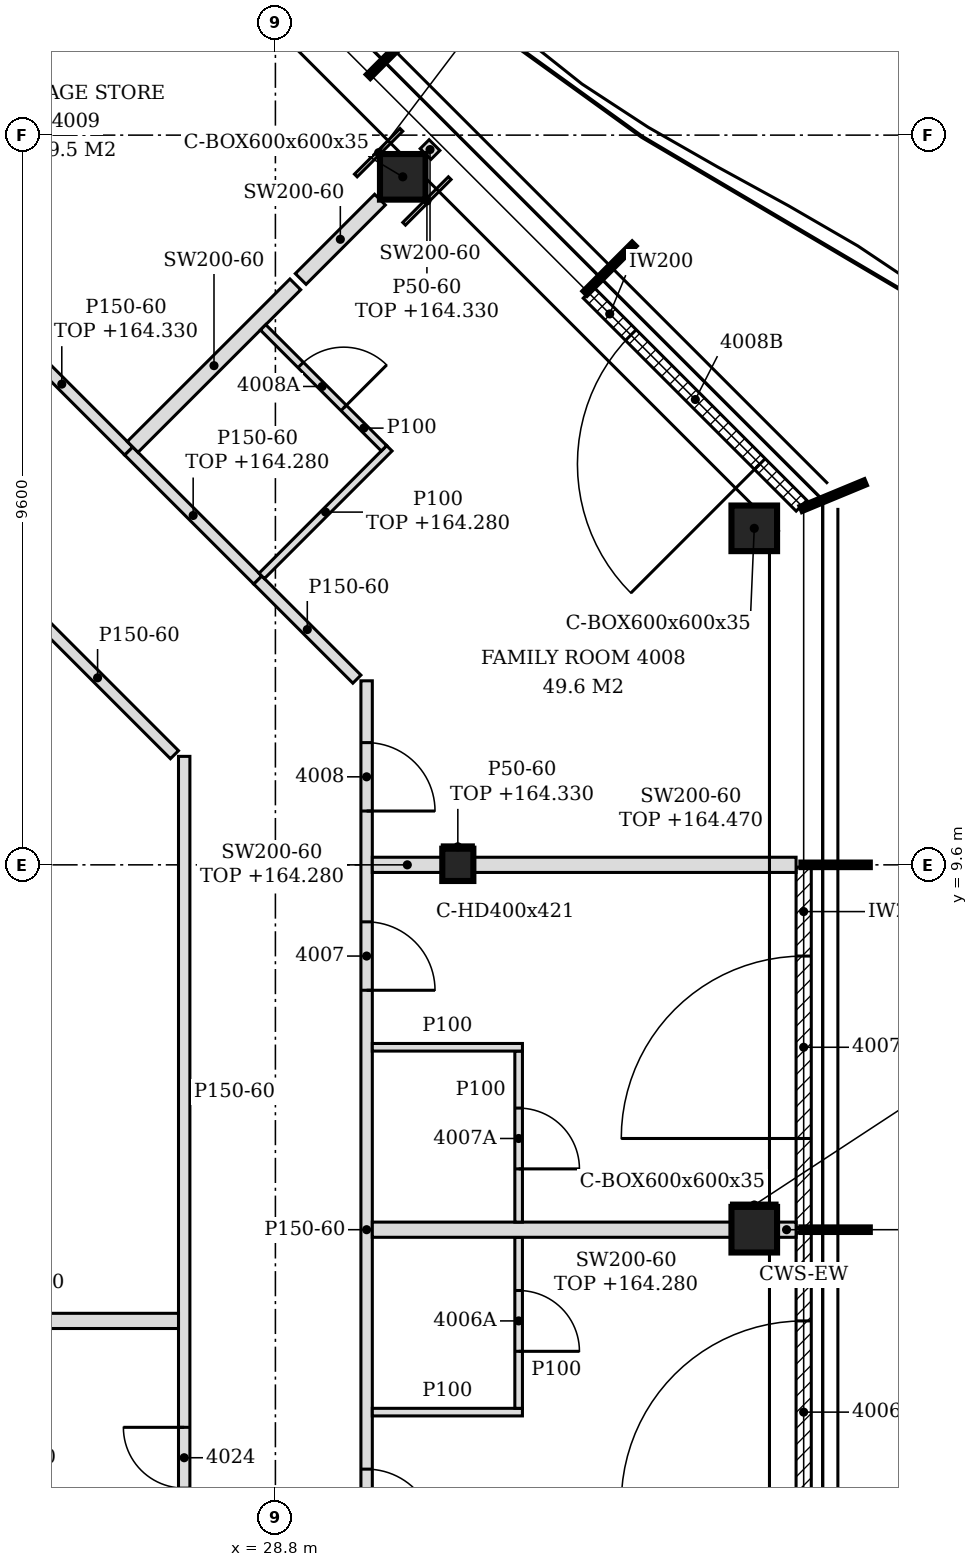
"""IFC4 building model, lengths in metres.
Left out: names, types, materials, properties, quantities, classifications, styles, units other than length and angle.
Written with IfcOpenShell. Run it as: python <this file> out.ifc"""

import sys

from ifc_helpers import new_model, si_unit, direction, frame, frame_2d, origin, origin_2d, place, context, subcontext, project, spatial, polyline, rectangle, hollow_rectangle, i_section, outline, extrude, element, fill, save


model = new_model("IFC4")
c1 = context("Model", 3, precision=1e-05, world=origin(), true_north=direction((0.0, 1.0)))
c2 = subcontext(c1, "Body", "Model", "MODEL_VIEW")
j1 = project(units=[si_unit("LENGTHUNIT", "METRE"), si_unit("PLANEANGLEUNIT", "RADIAN")], contexts=[c1])
p1 = place(None, origin())
s1 = spatial("IfcSite", under=j1, at=p1, CompositionType="ELEMENT")
p2 = place(p1, origin())
s2 = spatial("IfcBuilding", under=s1, at=p2, CompositionType="ELEMENT")
p3 = place(p2, frame((0.0, 0.0, 161.4)))
s3 = spatial("IfcBuildingStorey", under=s2, at=p3, CompositionType="ELEMENT", Elevation=161.4)
for number, where, z_axis, x_axis in (
    (1, (35.1, 4.8, -0.15), (0.0, 0.0, 1.0), (1.0, 0.0, 0.0)),
    (2, (35.1, 14.027, -0.15), (0.0, 0.0, 1.0), (1.0, 0.0, 0.0)),
    (3, (30.476, 18.652, -0.15), (0.0, 0.0, 1.0), (1.0, 0.0, 0.0)),
):
    element("IfcColumn", number, at=place(p3, frame(where, z_axis=z_axis, x_axis=x_axis)), inside=s3, PredefinedType="COLUMN", context=c2, shape_type="SweptSolid", body=[
        extrude(hollow_rectangle(XDim=0.6, YDim=0.6, WallThickness=0.035, at=origin_2d()), origin(), (0.0, 0.0, 1.0), 3.6),
    ])
p4 = place(p3, frame((31.2, 9.6, -0.15), z_axis=(0.0, 0.0, 1.0), x_axis=(1.0, 0.0, 0.0)))
e4 = element("IfcColumn", 4, at=p4, inside=s3, PredefinedType="COLUMN", context=c2, shape_type="SweptSolid", body=[
    extrude(i_section(OverallWidth=0.409, OverallDepth=0.425, WebThickness=0.033, FlangeThickness=0.052, FilletRadius=0.015, at=origin_2d()), origin(), (0.0, 0.0, 1.0), 3.6),
])
p5 = place(p3, frame((35.75, 0.03, 0.0), z_axis=(0.0, 0.0, 1.0), x_axis=(0.0, 1.0, 0.0)))
e5 = element("IfcWall", 5, at=p5, inside=s3, PredefinedType="NOTDEFINED", context=c2, shape_type="SweptSolid", body=[
    extrude(rectangle(XDim=4.74, YDim=0.2, at=frame_2d((2.37, 0.0))), origin(), (0.0, 0.0, 1.0), 3.45),
])
p6 = place(p5, frame((1.17, 0.0, 0.0)))
e6 = element("IfcOpeningElement", 6, at=p6, cuts=e5, PredefinedType="OPENING", context=c2, shape_type="SweptSolid", body=[
    extrude(rectangle(XDim=2.4, YDim=2.4, at=frame_2d((1.2, 1.2))), frame((0.0, 0.11, 0.0), z_axis=(0.0, -1.0, 0.0), x_axis=(1.0, 0.0, 0.0)), (0.0, 0.0, 1.0), 0.22),
])
p7 = place(p3, frame((35.75, 4.83, 0.0), z_axis=(0.0, 0.0, 1.0), x_axis=(0.0, 1.0, 0.0)))
e7 = element("IfcWall", 7, at=p7, inside=s3, PredefinedType="NOTDEFINED", context=c2, shape_type="SweptSolid", body=[
    extrude(rectangle(XDim=4.74, YDim=0.2, at=frame_2d((2.37, 0.0))), origin(), (0.0, 0.0, 1.0), 3.45),
])
p8 = place(p7, frame((1.17, 0.0, 0.0)))
e8 = element("IfcOpeningElement", 8, at=p8, cuts=e7, PredefinedType="OPENING", context=c2, shape_type="SweptSolid", body=[
    extrude(rectangle(XDim=2.4, YDim=2.4, at=frame_2d((1.2, 1.2))), frame((0.0, 0.11, 0.0), z_axis=(0.0, -1.0, 0.0), x_axis=(1.0, 0.0, 0.0)), (0.0, 0.0, 1.0), 0.22),
])
p9 = place(p3, frame((35.722, 14.325, 0.0), z_axis=(0.0, 0.0, 1.0), x_axis=(-0.707106781187, 0.707106781187, 0.0)))
e9 = element("IfcWall", 9, at=p9, inside=s3, PredefinedType="NOTDEFINED", context=c2, shape_type="SweptSolid", body=[
    extrude(rectangle(XDim=3.962, YDim=0.2, at=frame_2d((1.981, 0.0))), origin(), (0.0, 0.0, 1.0), 3.45),
])
p10 = place(p9, frame((0.775, 0.0, 0.0)))
e10 = element("IfcOpeningElement", 10, at=p10, cuts=e9, PredefinedType="OPENING", context=c2, shape_type="SweptSolid", body=[
    extrude(rectangle(XDim=2.4, YDim=2.4, at=frame_2d((1.2, 1.2))), frame((0.0, 0.11, 0.0), z_axis=(0.0, -1.0, 0.0), x_axis=(1.0, 0.0, 0.0)), (0.0, 0.0, 1.0), 0.22),
])
p11 = place(p3, frame((30.0, -0.813, 0.0), z_axis=(0.0, 0.0, 1.0), x_axis=(0.0, 1.0, 0.0)))
e11 = element("IfcWall", 11, at=p11, inside=s3, PredefinedType="PARTITIONING", context=c2, shape_type="SweptSolid", body=[
    extrude(outline(polyline([(0.0, 0.0), (12.834, 0.0), (12.834, 3.45), (10.518, 3.45), (10.516, 2.88), (10.308, 2.88), (10.306, 3.45), (5.718, 3.45), (5.716, 2.88), (5.508, 2.88), (5.506, 3.45), (0.918, 3.45), (0.916, 2.88), (0.708, 2.88), (0.706, 3.45), (0.0, 3.45), (0.0, 0.0)])), frame((0.0, 0.075, 0.0), z_axis=(0.0, -1.0, 0.0), x_axis=(1.0, 0.0, 0.0)), (0.0, 0.0, 1.0), 0.15),
])
p12 = place(p11, frame((1.563, 0.0, 0.0)))
e12 = element("IfcOpeningElement", 12, at=p12, cuts=e11, PredefinedType="OPENING", context=c2, shape_type="SweptSolid", body=[
    extrude(rectangle(XDim=0.9, YDim=2.1, at=frame_2d((0.45, 1.05))), frame((0.0, 0.085, 0.0), z_axis=(0.0, -1.0, 0.0), x_axis=(1.0, 0.0, 0.0)), (0.0, 0.0, 1.0), 0.17),
])
p13 = place(p11, frame((8.763, 0.0, 0.0)))
e13 = element("IfcOpeningElement", 13, at=p13, cuts=e11, PredefinedType="OPENING", context=c2, shape_type="SweptSolid", body=[
    extrude(rectangle(XDim=0.9, YDim=2.1, at=frame_2d((0.45, 1.05))), frame((0.0, 0.085, 0.0), z_axis=(0.0, -1.0, 0.0), x_axis=(1.0, 0.0, 0.0)), (0.0, 0.0, 1.0), 0.17),
])
p14 = place(p11, frame((11.121, 0.0, 0.0)))
e14 = element("IfcOpeningElement", 14, at=p14, cuts=e11, PredefinedType="OPENING", context=c2, shape_type="SweptSolid", body=[
    extrude(rectangle(XDim=0.9, YDim=2.1, at=frame_2d((0.45, 1.05))), frame((0.0, 0.085, 0.0), z_axis=(0.0, -1.0, 0.0), x_axis=(1.0, 0.0, 0.0)), (0.0, 0.0, 1.0), 0.17),
])
p15 = place(p3, frame((27.6, 0.1, 0.0), z_axis=(0.0, 0.0, 1.0), x_axis=(0.0, 1.0, 0.0)))
e15 = element("IfcWall", 15, at=p15, inside=s3, PredefinedType="PARTITIONING", context=c2, shape_type="SweptSolid", body=[
    extrude(outline(polyline([(0.0, 0.0), (10.927, 0.0), (10.927, 3.45), (9.605, 3.45), (9.603, 2.88), (9.395, 2.88), (9.393, 3.45), (4.805, 3.45), (4.803, 2.88), (4.595, 2.88), (4.593, 3.45), (0.005, 3.45), (0.003, 2.88), (0.0, 2.88), (0.0, 0.0)])), frame((0.0, 0.075, 0.0), z_axis=(0.0, -1.0, 0.0), x_axis=(1.0, 0.0, 0.0)), (0.0, 0.0, 1.0), 0.15),
])
p16 = place(p15, frame((1.3, 0.0, 0.0)))
e16 = element("IfcOpeningElement", 16, at=p16, cuts=e15, PredefinedType="OPENING", context=c2, shape_type="SweptSolid", body=[
    extrude(rectangle(XDim=0.8, YDim=2.1, at=frame_2d((0.4, 1.05))), frame((0.0, 0.085, 0.0), z_axis=(0.0, -1.0, 0.0), x_axis=(1.0, 0.0, 0.0)), (0.0, 0.0, 1.0), 0.17),
])
p17 = place(p3, frame((30.075, 2.4, 0.0), z_axis=(0.0, 0.0, 1.0), x_axis=(1.0, 0.0, 0.0)))
e17 = element("IfcWall", 17, at=p17, inside=s3, PredefinedType="PARTITIONING", context=c2, shape_type="SweptSolid", body=[
    extrude(outline(polyline([(0.0, 0.0), (1.975, 0.0), (1.975, 3.45), (1.275, 3.45), (1.273, 2.93), (0.975, 2.93), (0.973, 3.45), (0.0, 3.45), (0.0, 0.0)])), frame((0.0, 0.05, 0.0), z_axis=(0.0, -1.0, 0.0), x_axis=(1.0, 0.0, 0.0)), (0.0, 0.0, 1.0), 0.1),
])
p18 = place(p3, frame((32.0, 2.45, 0.0), z_axis=(0.0, 0.0, 1.0), x_axis=(0.0, 1.0, 0.0)))
e18 = element("IfcWall", 18, at=p18, inside=s3, PredefinedType="PARTITIONING", context=c2, shape_type="SweptSolid", body=[
    extrude(rectangle(XDim=2.25, YDim=0.1, at=frame_2d((1.125, 0.0))), origin(), (0.0, 0.0, 1.0), 3.45),
])
p19 = place(p18, frame((0.75, 0.0, 0.0)))
e19 = element("IfcOpeningElement", 19, at=p19, cuts=e18, PredefinedType="OPENING", context=c2, shape_type="SweptSolid", body=[
    extrude(rectangle(XDim=0.8, YDim=2.1, at=frame_2d((0.4, 1.05))), frame((0.0, 0.06, 0.0), z_axis=(0.0, -1.0, 0.0), x_axis=(1.0, 0.0, 0.0)), (0.0, 0.0, 1.0), 0.12),
])
p20 = place(p3, frame((24.2, 3.6, 0.0), z_axis=(0.0, 0.0, 1.0), x_axis=(1.0, 0.0, 0.0)))
e20 = element("IfcWall", 20, at=p20, inside=s3, PredefinedType="PARTITIONING", context=c2, shape_type="SweptSolid", body=[
    extrude(rectangle(XDim=3.325, YDim=0.2, at=frame_2d((1.663, 0.0))), origin(), (0.0, 0.0, 1.0), 3.45),
])
p21 = place(p3, frame((30.075, 4.8, 0.0), z_axis=(0.0, 0.0, 1.0), x_axis=(1.0, 0.0, 0.0)))
e21 = element("IfcWall", 21, at=p21, inside=s3, PredefinedType="PARTITIONING", context=c2, shape_type="SweptSolid", body=[
    extrude(rectangle(XDim=4.725, YDim=0.2, at=frame_2d((2.363, 0.0))), origin(), (0.0, 0.0, 1.0), 2.88),
])
p22 = place(p3, frame((35.4, 4.8, 0.0), z_axis=(0.0, 0.0, 1.0), x_axis=(1.0, 0.0, 0.0)))
e22 = element("IfcWall", 22, at=p22, inside=s3, PredefinedType="PARTITIONING", context=c2, shape_type="SweptSolid", body=[
    extrude(rectangle(XDim=0.25, YDim=0.2, at=frame_2d((0.125, 0.0))), origin(), (0.0, 0.0, 1.0), 3.45),
])
p23 = place(p3, frame((32.0, 4.9, 0.0), z_axis=(0.0, 0.0, 1.0), x_axis=(0.0, 1.0, 0.0)))
e23 = element("IfcWall", 23, at=p23, inside=s3, PredefinedType="PARTITIONING", context=c2, shape_type="SweptSolid", body=[
    extrude(rectangle(XDim=2.25, YDim=0.1, at=frame_2d((1.125, 0.0))), origin(), (0.0, 0.0, 1.0), 3.45),
])
p24 = place(p23, frame((0.7, 0.0, 0.0)))
e24 = element("IfcOpeningElement", 24, at=p24, cuts=e23, PredefinedType="OPENING", context=c2, shape_type="SweptSolid", body=[
    extrude(rectangle(XDim=0.8, YDim=2.1, at=frame_2d((0.4, 1.05))), frame((0.0, 0.06, 0.0), z_axis=(0.0, -1.0, 0.0), x_axis=(1.0, 0.0, 0.0)), (0.0, 0.0, 1.0), 0.12),
])
p25 = place(p3, frame((30.075, 7.2, 0.0), z_axis=(0.0, 0.0, 1.0), x_axis=(1.0, 0.0, 0.0)))
e25 = element("IfcWall", 25, at=p25, inside=s3, PredefinedType="PARTITIONING", context=c2, shape_type="SweptSolid", body=[
    extrude(outline(polyline([(0.0, 0.0), (1.975, 0.0), (1.975, 3.45), (1.275, 3.45), (1.273, 2.93), (0.975, 2.93), (0.973, 3.45), (0.0, 3.45), (0.0, 0.0)])), frame((0.0, 0.05, 0.0), z_axis=(0.0, -1.0, 0.0), x_axis=(1.0, 0.0, 0.0)), (0.0, 0.0, 1.0), 0.1),
])
p26 = place(p3, frame((30.075, 9.6, 0.0), z_axis=(0.0, 0.0, 1.0), x_axis=(1.0, 0.0, 0.0)))
e26 = element("IfcWall", 26, at=p26, inside=s3, PredefinedType="PARTITIONING", context=c2, shape_type="SweptSolid", body=[
    extrude(rectangle(XDim=0.921, YDim=0.2, at=frame_2d((0.46, 0.0))), origin(), (0.0, 0.0, 1.0), 2.88),
])
p27 = place(p3, frame((31.405, 9.6, 0.0), z_axis=(0.0, 0.0, 1.0), x_axis=(1.0, 0.0, 0.0)))
e27 = element("IfcWall", 27, at=p27, inside=s3, PredefinedType="PARTITIONING", context=c2, shape_type="SweptSolid", body=[
    extrude(outline(polyline([(0.0, 0.0), (4.245, 0.0), (4.246, 3.07), (3.845, 3.07), (3.844, 2.93), (3.545, 2.93), (3.543, 3.07), (0.0, 3.07), (0.0, 0.0)])), frame((0.0, 0.1, 0.0), z_axis=(0.0, -1.0, 0.0), x_axis=(1.0, 0.0, 0.0)), (0.0, 0.0, 1.0), 0.2),
])
p28 = place(p3, frame((27.472, 11.049, 0.0), z_axis=(0.0, 0.0, 1.0), x_axis=(-0.707106781187, 0.707106781187, 0.0)))
e28 = element("IfcWall", 28, at=p28, inside=s3, PredefinedType="PARTITIONING", context=c2, shape_type="SweptSolid", body=[
    extrude(rectangle(XDim=2.861, YDim=0.15, at=frame_2d((1.43, 0.0))), origin(), (0.0, 0.0, 1.0), 3.45),
])
p29 = place(p3, frame((29.872, 12.043, 0.0), z_axis=(0.0, 0.0, 1.0), x_axis=(-0.707172918471, 0.707040637716, 0.0)))
e29 = element("IfcWall", 29, at=p29, inside=s3, PredefinedType="PARTITIONING", context=c2, shape_type="SweptSolid", body=[
    extrude(rectangle(XDim=1.846, YDim=0.15, at=frame_2d((0.923, 0.0))), origin(), (0.0, 0.0, 1.0), 3.45),
])
p30 = place(p3, frame((28.567, 13.348, 0.0), z_axis=(0.0, 0.0, 1.0), x_axis=(-0.707310148094, 0.706903355773, 0.0)))
e30 = element("IfcWall", 30, at=p30, inside=s3, PredefinedType="PARTITIONING", context=c2, shape_type="SweptSolid", body=[
    extrude(rectangle(XDim=2.401, YDim=0.15, at=frame_2d((1.2, 0.0))), origin(), (0.0, 0.0, 1.0), 2.88),
])
p31 = place(p3, frame((28.62, 13.401, 0.0), z_axis=(0.0, 0.0, 1.0), x_axis=(0.707055379538, 0.707158179099, 0.0)))
e31 = element("IfcWall", 31, at=p31, inside=s3, PredefinedType="PARTITIONING", context=c2, shape_type="SweptSolid", body=[
    extrude(rectangle(XDim=2.375, YDim=0.1, at=frame_2d((1.188, 0.0))), origin(), (0.0, 0.0, 1.0), 2.88),
])
p32 = place(p3, frame((26.869, 15.045, 0.0), z_axis=(0.0, 0.0, 1.0), x_axis=(-0.706999586952, 0.707213959174, 0.0)))
e32 = element("IfcWall", 32, at=p32, inside=s3, PredefinedType="PARTITIONING", context=c2, shape_type="SweptSolid", body=[
    extrude(rectangle(XDim=5.694, YDim=0.15, at=frame_2d((2.847, 0.0))), origin(), (0.0, 0.0, 1.0), 2.93),
])
p33 = place(p32, frame((2.487, 0.0, 0.0)))
e33 = element("IfcOpeningElement", 33, at=p33, cuts=e32, PredefinedType="OPENING", context=c2, shape_type="SweptSolid", body=[
    extrude(rectangle(XDim=0.9, YDim=2.1, at=frame_2d((0.45, 1.05))), frame((0.0, 0.085, 0.0), z_axis=(0.0, -1.0, 0.0), x_axis=(1.0, 0.0, 0.0)), (0.0, 0.0, 1.0), 0.17),
])
p34 = place(p3, frame((26.922, 15.098, 0.0), z_axis=(0.0, 0.0, 1.0), x_axis=(0.707268147401, 0.706945378138, 0.0)))
e34 = element("IfcWall", 34, at=p34, inside=s3, PredefinedType="PARTITIONING", context=c2, shape_type="SweptSolid", body=[
    extrude(rectangle(XDim=3.026, YDim=0.2, at=frame_2d((1.513, 0.0))), origin(), (0.0, 0.0, 1.0), 3.45),
])
p35 = place(p3, frame((30.229, 15.08, 0.0), z_axis=(0.0, 0.0, 1.0), x_axis=(-0.707052524, 0.70716103421, 0.0)))
e35 = element("IfcWall", 35, at=p35, inside=s3, PredefinedType="PARTITIONING", context=c2, shape_type="SweptSolid", body=[
    extrude(rectangle(XDim=2.25, YDim=0.1, at=frame_2d((1.125, 0.0))), origin(), (0.0, 0.0, 1.0), 3.45),
])
p36 = place(p35, frame((0.75, 0.0, 0.0)))
e36 = element("IfcOpeningElement", 36, at=p36, cuts=e35, PredefinedType="OPENING", context=c2, shape_type="SweptSolid", body=[
    extrude(rectangle(XDim=0.8, YDim=2.1, at=frame_2d((0.4, 1.05))), frame((0.0, 0.06, 0.0), z_axis=(0.0, -1.0, 0.0), x_axis=(1.0, 0.0, 0.0)), (0.0, 0.0, 1.0), 0.12),
])
p37 = place(p3, frame((29.133, 17.308, 0.0), z_axis=(0.0, 0.0, 1.0), x_axis=(0.707024044771, 0.707189507922, 0.0)))
e37 = element("IfcWall", 37, at=p37, inside=s3, PredefinedType="PARTITIONING", context=c2, shape_type="SweptSolid", body=[
    extrude(rectangle(XDim=1.476, YDim=0.2, at=frame_2d((0.738, 0.0))), origin(), (0.0, 0.0, 1.0), 3.45),
])
p38 = place(p3, frame((30.776, 18.951, 0.0), z_axis=(0.0, 0.0, 1.0), x_axis=(0.706370595651, 0.707842201059, 0.0)))
e38 = element("IfcWall", 38, at=p38, inside=s3, PredefinedType="PARTITIONING", context=c2, shape_type="SweptSolid", body=[
    extrude(rectangle(XDim=0.166, YDim=0.2, at=frame_2d((0.083, 0.0))), origin(), (0.0, 0.0, 1.0), 3.45),
])
p39 = place(p3, frame((34.8, 5.125, 0.0), z_axis=(0.0, 0.0, 1.0), x_axis=(1.0, 0.0, 0.0)))
e39 = element("IfcWall", 39, at=p39, inside=s3, PredefinedType="PARTITIONING", context=c2, shape_type="SweptSolid", body=[
    extrude(rectangle(XDim=0.6, YDim=0.05, at=frame_2d((0.3, 0.0))), origin(), (0.0, 0.0, 1.0), 2.93),
])
p40 = place(p3, frame((30.996, 9.837, 0.0), z_axis=(0.0, 0.0, 1.0), x_axis=(1.0, 0.0, 0.0)))
e40 = element("IfcWall", 40, at=p40, inside=s3, PredefinedType="PARTITIONING", context=c2, shape_type="SweptSolid", body=[
    extrude(rectangle(XDim=0.409, YDim=0.05, at=frame_2d((0.205, 0.0))), origin(), (0.0, 0.0, 1.0), 2.93),
])
p41 = place(p3, frame((29.858, 18.669, 0.0), z_axis=(0.0, 0.0, 1.0), x_axis=(0.707106781187, 0.707106781187, 0.0)))
e41 = element("IfcWall", 41, at=p41, inside=s3, PredefinedType="PARTITIONING", context=c2, shape_type="SweptSolid", body=[
    extrude(rectangle(XDim=0.849, YDim=0.05, at=frame_2d((0.424, 0.0))), origin(), (0.0, 0.0, 1.0), 2.63),
])
p42 = place(p3, frame((30.493, 18.034, 0.0), z_axis=(0.0, 0.0, 1.0), x_axis=(0.707106781187, 0.707106781187, 0.0)))
e42 = element("IfcWall", 42, at=p42, inside=s3, PredefinedType="PARTITIONING", context=c2, shape_type="SweptSolid", body=[
    extrude(rectangle(XDim=0.849, YDim=0.05, at=frame_2d((0.424, 0.0))), origin(), (0.0, 0.0, 1.0), 2.93),
])
p43 = place(p6, origin())
e43 = element("IfcDoor", 43, at=p43, inside=s3, OperationType="SINGLE_SWING_LEFT", PredefinedType="DOOR", context=c2, shape_type="SweptSolid", body=[
    extrude(rectangle(XDim=2.4, YDim=2.4, at=frame_2d((1.2, 1.2))), frame((0.0, 0.025, 0.0), z_axis=(0.0, -1.0, 0.0), x_axis=(1.0, 0.0, 0.0)), (0.0, 0.0, 1.0), 0.05),
])
fill(e6, e43)
p44 = place(p8, origin())
e44 = element("IfcDoor", 44, at=p44, inside=s3, OperationType="SINGLE_SWING_LEFT", PredefinedType="DOOR", context=c2, shape_type="SweptSolid", body=[
    extrude(rectangle(XDim=2.4, YDim=2.4, at=frame_2d((1.2, 1.2))), frame((0.0, 0.025, 0.0), z_axis=(0.0, -1.0, 0.0), x_axis=(1.0, 0.0, 0.0)), (0.0, 0.0, 1.0), 0.05),
])
fill(e8, e44)
p45 = place(p10, origin())
e45 = element("IfcDoor", 45, at=p45, inside=s3, OperationType="SINGLE_SWING_LEFT", PredefinedType="DOOR", context=c2, shape_type="SweptSolid", body=[
    extrude(rectangle(XDim=2.4, YDim=2.4, at=frame_2d((1.2, 1.2))), frame((0.0, 0.025, 0.0), z_axis=(0.0, -1.0, 0.0), x_axis=(1.0, 0.0, 0.0)), (0.0, 0.0, 1.0), 0.05),
])
fill(e10, e45)
p46 = place(p12, frame((0.9, 0.0, 0.0), z_axis=(0.0, 0.0, 1.0), x_axis=(-1.0, 0.0, 0.0)))
e46 = element("IfcDoor", 46, at=p46, inside=s3, OperationType="SINGLE_SWING_RIGHT", PredefinedType="DOOR", context=c2, shape_type="SweptSolid", body=[
    extrude(rectangle(XDim=0.9, YDim=2.1, at=frame_2d((0.45, 1.05))), frame((0.0, 0.025, 0.0), z_axis=(0.0, -1.0, 0.0), x_axis=(1.0, 0.0, 0.0)), (0.0, 0.0, 1.0), 0.05),
])
fill(e12, e46)
p47 = place(p19, frame((0.8, 0.0, 0.0), z_axis=(0.0, 0.0, 1.0), x_axis=(-1.0, 0.0, 0.0)))
e47 = element("IfcDoor", 47, at=p47, inside=s3, OperationType="SINGLE_SWING_RIGHT", PredefinedType="DOOR", context=c2, shape_type="SweptSolid", body=[
    extrude(rectangle(XDim=0.8, YDim=2.1, at=frame_2d((0.4, 1.05))), frame((0.0, 0.025, 0.0), z_axis=(0.0, -1.0, 0.0), x_axis=(1.0, 0.0, 0.0)), (0.0, 0.0, 1.0), 0.05),
])
fill(e19, e47)
p48 = place(p13, frame((0.9, 0.0, 0.0), z_axis=(0.0, 0.0, 1.0), x_axis=(-1.0, 0.0, 0.0)))
e48 = element("IfcDoor", 48, at=p48, inside=s3, OperationType="SINGLE_SWING_RIGHT", PredefinedType="DOOR", context=c2, shape_type="SweptSolid", body=[
    extrude(rectangle(XDim=0.9, YDim=2.1, at=frame_2d((0.45, 1.05))), frame((0.0, 0.025, 0.0), z_axis=(0.0, -1.0, 0.0), x_axis=(1.0, 0.0, 0.0)), (0.0, 0.0, 1.0), 0.05),
])
fill(e13, e48)
p49 = place(p24, frame((0.8, 0.0, 0.0), z_axis=(0.0, 0.0, 1.0), x_axis=(-1.0, 0.0, 0.0)))
e49 = element("IfcDoor", 49, at=p49, inside=s3, OperationType="SINGLE_SWING_RIGHT", PredefinedType="DOOR", context=c2, shape_type="SweptSolid", body=[
    extrude(rectangle(XDim=0.8, YDim=2.1, at=frame_2d((0.4, 1.05))), frame((0.0, 0.025, 0.0), z_axis=(0.0, -1.0, 0.0), x_axis=(1.0, 0.0, 0.0)), (0.0, 0.0, 1.0), 0.05),
])
fill(e24, e49)
p50 = place(p14, frame((0.9, 0.0, 0.0), z_axis=(0.0, 0.0, 1.0), x_axis=(-1.0, 0.0, 0.0)))
e50 = element("IfcDoor", 50, at=p50, inside=s3, OperationType="SINGLE_SWING_RIGHT", PredefinedType="DOOR", context=c2, shape_type="SweptSolid", body=[
    extrude(rectangle(XDim=0.9, YDim=2.1, at=frame_2d((0.45, 1.05))), frame((0.0, 0.025, 0.0), z_axis=(0.0, -1.0, 0.0), x_axis=(1.0, 0.0, 0.0)), (0.0, 0.0, 1.0), 0.05),
])
fill(e14, e50)
p51 = place(p36, frame((0.8, 0.0, 0.0), z_axis=(0.0, 0.0, 1.0), x_axis=(-1.0, 0.0, 0.0)))
e51 = element("IfcDoor", 51, at=p51, inside=s3, OperationType="SINGLE_SWING_RIGHT", PredefinedType="DOOR", context=c2, shape_type="SweptSolid", body=[
    extrude(rectangle(XDim=0.8, YDim=2.1, at=frame_2d((0.4, 1.05))), frame((0.0, 0.025, 0.0), z_axis=(0.0, -1.0, 0.0), x_axis=(1.0, 0.0, 0.0)), (0.0, 0.0, 1.0), 0.05),
])
fill(e36, e51)
p52 = place(p16, origin())
e52 = element("IfcDoor", 52, at=p52, inside=s3, OperationType="SINGLE_SWING_RIGHT", PredefinedType="DOOR", context=c2, shape_type="SweptSolid", body=[
    extrude(rectangle(XDim=0.8, YDim=2.1, at=frame_2d((0.4, 1.05))), frame((0.0, 0.025, 0.0), z_axis=(0.0, -1.0, 0.0), x_axis=(1.0, 0.0, 0.0)), (0.0, 0.0, 1.0), 0.05),
])
fill(e16, e52)
save(model, sys.argv[1])
